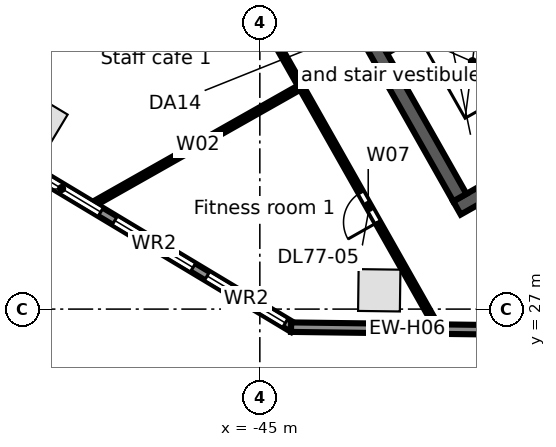
"""IFC4 building model, lengths in metres.
Left out: names, types, materials, properties, quantities, classifications, styles, units other than length and angle.
Written with IfcOpenShell. Run it as: python <this file> out.ifc"""

import sys

from ifc_helpers import new_model, si_unit, direction, frame, frame_2d, origin, origin_2d, place, context, subcontext, project, spatial, rectangle, extrude, element, fill, save


model = new_model("IFC4")
c1 = context("Model", 3, precision=1e-05, world=origin(), true_north=direction((0.0, 1.0)))
c2 = subcontext(c1, "Body", "Model", "MODEL_VIEW")
j1 = project(units=[si_unit("LENGTHUNIT", "METRE"), si_unit("PLANEANGLEUNIT", "RADIAN")], contexts=[c1])
p1 = place(None, origin())
s1 = spatial("IfcSite", under=j1, at=p1, CompositionType="ELEMENT")
p2 = place(p1, origin())
s2 = spatial("IfcBuilding", under=s1, at=p2, CompositionType="ELEMENT")
p3 = place(p2, frame((0.0, 0.0, 339.3)))
s3 = spatial("IfcBuildingStorey", under=s2, at=p3, CompositionType="ELEMENT", Elevation=339.3)
for number, where, z_axis, x_axis in (
    (1, (-50.812, 31.931, 0.0), (0.0, 0.0, 1.0), (0.857, -0.515, 0.0)),
    (2, (-41.858, 27.495, 0.0), (0.0, 0.0, 1.0), (1.0, -0.013, 0.0)),
):
    element("IfcColumn", number, at=place(p3, frame(where, z_axis=z_axis, x_axis=x_axis)), inside=s3, PredefinedType="COLUMN", context=c2, shape_type="SweptSolid", body=[
        extrude(rectangle(XDim=1.1, YDim=1.1, at=origin_2d()), origin(), (0.0, 0.0, 1.0), 3.8),
    ])
p4 = place(p3, frame((-44.115, 26.507, 0.0), z_axis=(0.0, 0.0, 1.0), x_axis=(-0.857166583633, 0.515039268311, 0.0)))
e3 = element("IfcWall", 3, at=p4, inside=s3, PredefinedType="STANDARD", context=c2, shape_type="SweptSolid", body=[
    extrude(rectangle(XDim=17.106, YDim=0.25, at=frame_2d((8.553, 0.0))), origin(), (0.0, 0.0, 1.0), 3.52),
])
p5 = place(p4, frame((14.417, 0.0, 0.8)))
e4 = element("IfcOpeningElement", 4, at=p5, cuts=e3, PredefinedType="OPENING", context=c2, shape_type="SweptSolid", body=[
    extrude(rectangle(XDim=2.4, YDim=2.2, at=frame_2d((1.2, 1.1))), frame((0.0, 0.135, 0.0), z_axis=(0.0, -1.0, 0.0), x_axis=(1.0, 0.0, 0.0)), (0.0, 0.0, 1.0), 0.27),
])
p6 = place(p4, frame((11.584, 0.0, 0.8)))
e5 = element("IfcOpeningElement", 5, at=p6, cuts=e3, PredefinedType="OPENING", context=c2, shape_type="SweptSolid", body=[
    extrude(rectangle(XDim=2.4, YDim=2.2, at=frame_2d((1.2, 1.1))), frame((0.0, 0.135, 0.0), z_axis=(0.0, -1.0, 0.0), x_axis=(1.0, 0.0, 0.0)), (0.0, 0.0, 1.0), 0.27),
])
p7 = place(p4, frame((8.75, 0.0, 0.8)))
e6 = element("IfcOpeningElement", 6, at=p7, cuts=e3, PredefinedType="OPENING", context=c2, shape_type="SweptSolid", body=[
    extrude(rectangle(XDim=2.4, YDim=2.2, at=frame_2d((1.2, 1.1))), frame((0.0, 0.135, 0.0), z_axis=(0.0, -1.0, 0.0), x_axis=(1.0, 0.0, 0.0)), (0.0, 0.0, 1.0), 0.27),
])
p8 = place(p4, frame((5.917, 0.0, 0.8)))
e7 = element("IfcOpeningElement", 7, at=p8, cuts=e3, PredefinedType="OPENING", context=c2, shape_type="SweptSolid", body=[
    extrude(rectangle(XDim=2.4, YDim=2.2, at=frame_2d((1.2, 1.1))), frame((0.0, 0.135, 0.0), z_axis=(0.0, -1.0, 0.0), x_axis=(1.0, 0.0, 0.0)), (0.0, 0.0, 1.0), 0.27),
])
p9 = place(p4, frame((3.084, 0.0, 0.8)))
e8 = element("IfcOpeningElement", 8, at=p9, cuts=e3, PredefinedType="OPENING", context=c2, shape_type="SweptSolid", body=[
    extrude(rectangle(XDim=2.4, YDim=2.2, at=frame_2d((1.2, 1.1))), frame((0.0, 0.135, 0.0), z_axis=(0.0, -1.0, 0.0), x_axis=(1.0, 0.0, 0.0)), (0.0, 0.0, 1.0), 0.27),
])
p10 = place(p4, frame((0.25, 0.0, 0.8)))
e9 = element("IfcOpeningElement", 9, at=p10, cuts=e3, PredefinedType="OPENING", context=c2, shape_type="SweptSolid", body=[
    extrude(rectangle(XDim=2.4, YDim=2.2, at=frame_2d((1.2, 1.1))), frame((0.0, 0.135, 0.0), z_axis=(0.0, -1.0, 0.0), x_axis=(1.0, 0.0, 0.0)), (0.0, 0.0, 1.0), 0.27),
])
p11 = place(p3, frame((-38.064, 26.445, 0.0), z_axis=(0.0, 0.0, 1.0), x_axis=(-0.999914239143, 0.013096349097, 0.0)))
e10 = element("IfcWall", 10, at=p11, inside=s3, PredefinedType="STANDARD", context=c2, shape_type="SweptSolid", body=[
    extrude(rectangle(XDim=6.115, YDim=0.25, at=frame_2d((3.057, 0.0))), origin(), (0.0, 0.0, 1.0), 3.52),
])
p12 = place(p3, frame((-39.813, 29.662, 0.0), z_axis=(0.0, 0.0, 1.0), x_axis=(0.870350116061, 0.492433422375, 0.0)))
e11 = element("IfcWall", 11, at=p12, inside=s3, PredefinedType="SOLIDWALL", context=c2, shape_type="SweptSolid", body=[
    extrude(rectangle(XDim=17.0, YDim=0.4, at=frame_2d((8.5, 0.0))), origin(), (0.0, 0.0, 1.0), 3.52),
])
p13 = place(p12, frame((7.2, 0.0, 0.0)))
e12 = element("IfcOpeningElement", 12, at=p13, cuts=e11, PredefinedType="OPENING", context=c2, shape_type="SweptSolid", body=[
    extrude(rectangle(XDim=1.2, YDim=2.1, at=frame_2d((0.6, 1.05))), frame((0.0, 0.21, 0.0), z_axis=(0.0, -1.0, 0.0), x_axis=(1.0, 0.0, 0.0)), (0.0, 0.0, 1.0), 0.42),
])
p14 = place(p3, frame((-41.73, 33.863, 0.0), z_axis=(0.0, 0.0, 1.0), x_axis=(0.870350800578, 0.492432212525, 0.0)))
e13 = element("IfcWall", 13, at=p14, inside=s3, PredefinedType="SOLIDWALL", context=c2, shape_type="SweptSolid", body=[
    extrude(rectangle(XDim=6.2, YDim=0.3, at=frame_2d((3.1, 0.0))), origin(), (0.0, 0.0, 1.0), 3.52),
])
p15 = place(p14, frame((1.3, 0.0, 0.0)))
e14 = element("IfcOpeningElement", 14, at=p15, cuts=e13, PredefinedType="OPENING", context=c2, shape_type="SweptSolid", body=[
    extrude(rectangle(XDim=1.1, YDim=2.1, at=frame_2d((0.55, 1.05))), frame((0.0, 0.16, 0.0), z_axis=(0.0, -1.0, 0.0), x_axis=(1.0, 0.0, 0.0)), (0.0, 0.0, 1.0), 0.32),
])
p16 = place(p14, frame((4.95, 0.0, 0.0)))
e15 = element("IfcOpeningElement", 15, at=p16, cuts=e13, PredefinedType="OPENING", context=c2, shape_type="SweptSolid", body=[
    extrude(rectangle(XDim=0.9, YDim=2.1, at=frame_2d((0.45, 1.05))), frame((0.0, 0.16, 0.0), z_axis=(0.0, -1.0, 0.0), x_axis=(1.0, 0.0, 0.0)), (0.0, 0.0, 1.0), 0.32),
])
p17 = place(p3, frame((-46.238, 41.423, 0.0), z_axis=(0.0, 0.0, 1.0), x_axis=(0.492421663121, -0.870356769198, 0.0)))
e16 = element("IfcWall", 16, at=p17, inside=s3, PredefinedType="SOLIDWALL", context=c2, shape_type="SweptSolid", body=[
    extrude(rectangle(XDim=13.2, YDim=0.4, at=frame_2d((6.6, 0.0))), origin(), (0.0, 0.0, 1.0), 3.52),
])
p18 = place(p3, frame((-54.26, 32.749, 0.0), z_axis=(0.0, 0.0, 1.0), x_axis=(0.870418654615, 0.492312264419, 0.0)))
e17 = element("IfcWall", 17, at=p18, inside=s3, PredefinedType="PARTITIONING", context=c2, shape_type="SweptSolid", body=[
    extrude(rectangle(XDim=9.053, YDim=0.125, at=frame_2d((4.527, 0.0))), origin(), (0.0, 0.0, 1.0), 2.8),
])
p19 = place(p3, frame((-49.335, 29.79, 0.0), z_axis=(0.0, 0.0, 1.0), x_axis=(0.870383085237, 0.492375146542, 0.0)))
e18 = element("IfcWall", 18, at=p19, inside=s3, PredefinedType="PARTITIONING", context=c2, shape_type="SweptSolid", body=[
    extrude(rectangle(XDim=6.225, YDim=0.125, at=frame_2d((3.112, 0.0))), origin(), (0.0, 0.0, 1.0), 2.8),
])
p20 = place(p3, frame((-46.38, 37.206, 0.0), z_axis=(0.0, 0.0, 1.0), x_axis=(0.49260101091, -0.870255275221, 0.0)))
e19 = element("IfcWall", 19, at=p20, inside=s3, PredefinedType="PARTITIONING", context=c2, shape_type="SweptSolid", body=[
    extrude(rectangle(XDim=5.0, YDim=0.125, at=frame_2d((2.5, 0.0))), origin(), (0.0, 0.0, 1.0), 2.8),
])
p21 = place(p20, frame((1.95, 0.0, 0.0)))
e20 = element("IfcOpeningElement", 20, at=p21, cuts=e19, PredefinedType="OPENING", context=c2, shape_type="SweptSolid", body=[
    extrude(rectangle(XDim=0.9, YDim=2.1, at=frame_2d((0.45, 1.05))), frame((0.0, 0.073, 0.0), z_axis=(0.0, -1.0, 0.0), x_axis=(1.0, 0.0, 0.0)), (0.0, 0.0, 1.0), 0.145),
])
p22 = place(p3, frame((-43.917, 32.855, 0.0), z_axis=(0.0, 0.0, 1.0), x_axis=(0.492446757002, -0.870342571358, 0.0)))
e21 = element("IfcWall", 21, at=p22, inside=s3, PredefinedType="PARTITIONING", context=c2, shape_type="SweptSolid", body=[
    extrude(rectangle(XDim=7.187, YDim=0.125, at=frame_2d((3.593, 0.0))), origin(), (0.0, 0.0, 1.0), 2.8),
])
p23 = place(p22, frame((3.2, 0.0, 0.0)))
e22 = element("IfcOpeningElement", 22, at=p23, cuts=e21, PredefinedType="OPENING", context=c2, shape_type="SweptSolid", body=[
    extrude(rectangle(XDim=0.9, YDim=2.1, at=frame_2d((0.45, 1.05))), frame((0.0, 0.073, 0.0), z_axis=(0.0, -1.0, 0.0), x_axis=(1.0, 0.0, 0.0)), (0.0, 0.0, 1.0), 0.145),
])
p24 = place(p8, origin())
e23 = element("IfcWindow", 23, at=p24, inside=s3, PartitioningType="SINGLE_PANEL", PredefinedType="WINDOW", context=c2, shape_type="SweptSolid", body=[
    extrude(rectangle(XDim=2.4, YDim=2.2, at=frame_2d((1.2, 1.1))), frame((0.0, 0.03, 0.0), z_axis=(0.0, -1.0, 0.0), x_axis=(1.0, 0.0, 0.0)), (0.0, 0.0, 1.0), 0.06),
])
fill(e7, e23)
p25 = place(p9, origin())
e24 = element("IfcWindow", 24, at=p25, inside=s3, PartitioningType="SINGLE_PANEL", PredefinedType="WINDOW", context=c2, shape_type="SweptSolid", body=[
    extrude(rectangle(XDim=2.4, YDim=2.2, at=frame_2d((1.2, 1.1))), frame((0.0, 0.03, 0.0), z_axis=(0.0, -1.0, 0.0), x_axis=(1.0, 0.0, 0.0)), (0.0, 0.0, 1.0), 0.06),
])
fill(e8, e24)
p26 = place(p10, origin())
e25 = element("IfcWindow", 25, at=p26, inside=s3, PartitioningType="SINGLE_PANEL", PredefinedType="WINDOW", context=c2, shape_type="SweptSolid", body=[
    extrude(rectangle(XDim=2.4, YDim=2.2, at=frame_2d((1.2, 1.1))), frame((0.0, 0.03, 0.0), z_axis=(0.0, -1.0, 0.0), x_axis=(1.0, 0.0, 0.0)), (0.0, 0.0, 1.0), 0.06),
])
fill(e9, e25)
p27 = place(p23, frame((0.9, 0.0, 0.0), z_axis=(0.0, 0.0, 1.0), x_axis=(-1.0, 0.0, 0.0)))
e26 = element("IfcDoor", 26, at=p27, inside=s3, OperationType="SINGLE_SWING_LEFT", PredefinedType="DOOR", context=c2, shape_type="SweptSolid", body=[
    extrude(rectangle(XDim=0.9, YDim=2.1, at=frame_2d((0.45, 1.05))), frame((0.0, 0.025, 0.0), z_axis=(0.0, -1.0, 0.0), x_axis=(1.0, 0.0, 0.0)), (0.0, 0.0, 1.0), 0.05),
])
fill(e22, e26)
save(model, sys.argv[1])
